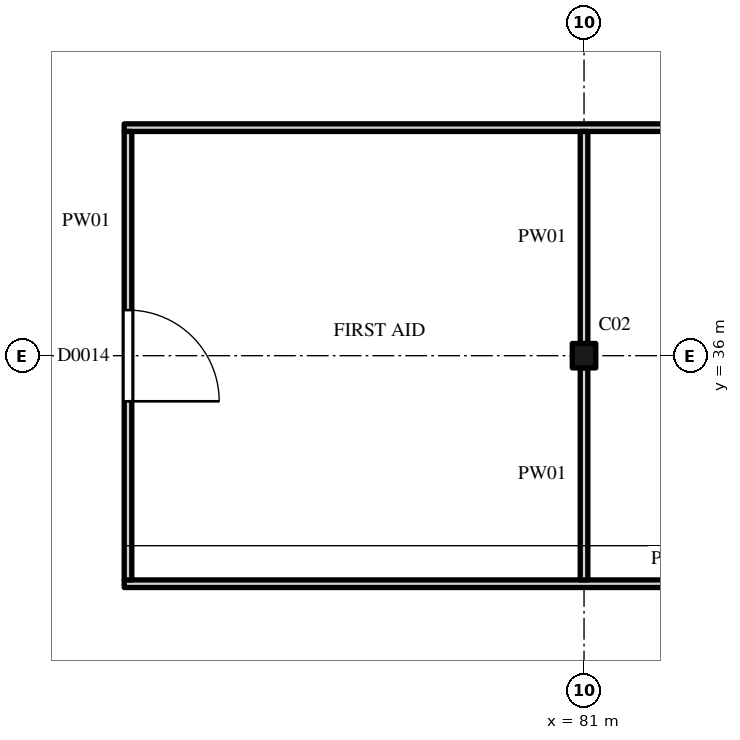
"""IFC4 building model, lengths in metres.
Left out: names, types, materials, properties, quantities, classifications, styles, units other than length and angle.
Written with IfcOpenShell. Run it as: python <this file> out.ifc"""

import sys

from ifc_helpers import new_model, si_unit, direction, frame, frame_2d, origin, origin_2d, place, context, subcontext, project, spatial, rectangle, i_section, extrude, element, fill, save


model = new_model("IFC4")
c1 = context("Model", 3, precision=1e-05, world=origin(), true_north=direction((0.0, 1.0)))
c2 = subcontext(c1, "Body", "Model", "MODEL_VIEW")
j1 = project(units=[si_unit("LENGTHUNIT", "METRE"), si_unit("PLANEANGLEUNIT", "RADIAN")], contexts=[c1])
p1 = place(None, origin())
s1 = spatial("IfcSite", under=j1, at=p1, CompositionType="ELEMENT")
p2 = place(p1, origin())
s2 = spatial("IfcBuilding", under=s1, at=p2, CompositionType="ELEMENT")
p3 = place(p2, origin())
s3 = spatial("IfcBuildingStorey", under=s2, at=p3, CompositionType="ELEMENT", Elevation=0.0)
p4 = place(p3, frame((81.0, 36.0, 0.0), z_axis=(0.0, 0.0, 1.0), x_axis=(1.0, 0.0, 0.0)))
e1 = element("IfcColumn", 1, at=p4, inside=s3, PredefinedType="COLUMN", context=c2, shape_type="SweptSolid", body=[
    extrude(i_section(OverallWidth=0.309, OverallDepth=0.321, WebThickness=0.014, FlangeThickness=0.022, FilletRadius=0.017, at=origin_2d()), origin(), (0.0, 0.0, 1.0), 6.0),
])
p5 = place(p3, frame((74.95, 33.0, 0.0), z_axis=(0.0, 0.0, 1.0), x_axis=(1.0, 0.0, 0.0)))
e2 = element("IfcWall", 2, at=p5, inside=s3, PredefinedType="PARTITIONING", context=c2, shape_type="SweptSolid", body=[
    extrude(rectangle(XDim=33.65, YDim=0.1, at=frame_2d((16.825, 0.0))), origin(), (0.0, 0.0, 1.0), 5.422),
])
p6 = place(p5, frame((14.5, 0.0, 0.0)))
e3 = element("IfcOpeningElement", 3, at=p6, cuts=e2, PredefinedType="OPENING", context=c2, shape_type="SweptSolid", body=[
    extrude(rectangle(XDim=1.1, YDim=2.1, at=frame_2d((0.55, 1.05))), frame((0.0, 0.06, 0.0), z_axis=(0.0, -1.0, 0.0), x_axis=(1.0, 0.0, 0.0)), (0.0, 0.0, 1.0), 0.12),
])
p7 = place(p5, frame((28.1, 0.0, 0.0)))
e4 = element("IfcOpeningElement", 4, at=p7, cuts=e2, PredefinedType="OPENING", context=c2, shape_type="SweptSolid", body=[
    extrude(rectangle(XDim=0.9, YDim=2.1, at=frame_2d((0.45, 1.05))), frame((0.0, 0.06, 0.0), z_axis=(0.0, -1.0, 0.0), x_axis=(1.0, 0.0, 0.0)), (0.0, 0.0, 1.0), 0.12),
])
p8 = place(p3, frame((74.95, 39.0, 0.0), z_axis=(0.0, 0.0, 1.0), x_axis=(1.0, 0.0, 0.0)))
e5 = element("IfcWall", 5, at=p8, inside=s3, PredefinedType="PARTITIONING", context=c2, shape_type="SweptSolid", body=[
    extrude(rectangle(XDim=32.95, YDim=0.1, at=frame_2d((16.475, 0.0))), origin(), (0.0, 0.0, 1.0), 5.422),
])
p9 = place(p3, frame((75.0, 33.05, 0.0), z_axis=(0.0, 0.0, 1.0), x_axis=(0.0, 1.0, 0.0)))
e6 = element("IfcWall", 6, at=p9, inside=s3, PredefinedType="PARTITIONING", context=c2, shape_type="SweptSolid", body=[
    extrude(rectangle(XDim=5.9, YDim=0.1, at=frame_2d((2.95, 0.0))), origin(), (0.0, 0.0, 1.0), 5.825),
])
p10 = place(p9, frame((2.35, 0.0, 0.0)))
e7 = element("IfcOpeningElement", 7, at=p10, cuts=e6, PredefinedType="OPENING", context=c2, shape_type="SweptSolid", body=[
    extrude(rectangle(XDim=1.2, YDim=2.1, at=frame_2d((0.6, 1.05))), frame((0.0, 0.06, 0.0), z_axis=(0.0, -1.0, 0.0), x_axis=(1.0, 0.0, 0.0)), (0.0, 0.0, 1.0), 0.12),
])
for number, where, z_axis, x_axis in (
    (8, (81.0, 33.05, 0.0), (0.0, 0.0, 1.0), (0.0, 1.0, 0.0)),
    (9, (81.0, 36.16, 0.0), (0.0, 0.0, 1.0), (0.0, 1.0, 0.0)),
):
    element("IfcWall", number, at=place(p3, frame(where, z_axis=z_axis, x_axis=x_axis)), inside=s3, PredefinedType="PARTITIONING", context=c2, shape_type="SweptSolid", body=[
        extrude(rectangle(XDim=2.79, YDim=0.1, at=frame_2d((1.395, 0.0))), origin(), (0.0, 0.0, 1.0), 5.292),
    ])
p11 = place(p10, origin())
e10 = element("IfcDoor", 10, at=p11, inside=s3, OperationType="SINGLE_SWING_LEFT", PredefinedType="DOOR", context=c2, shape_type="SweptSolid", body=[
    extrude(rectangle(XDim=1.2, YDim=2.1, at=frame_2d((0.6, 1.05))), frame((0.0, 0.025, 0.0), z_axis=(0.0, -1.0, 0.0), x_axis=(1.0, 0.0, 0.0)), (0.0, 0.0, 1.0), 0.05),
])
fill(e7, e10)
save(model, sys.argv[1])
